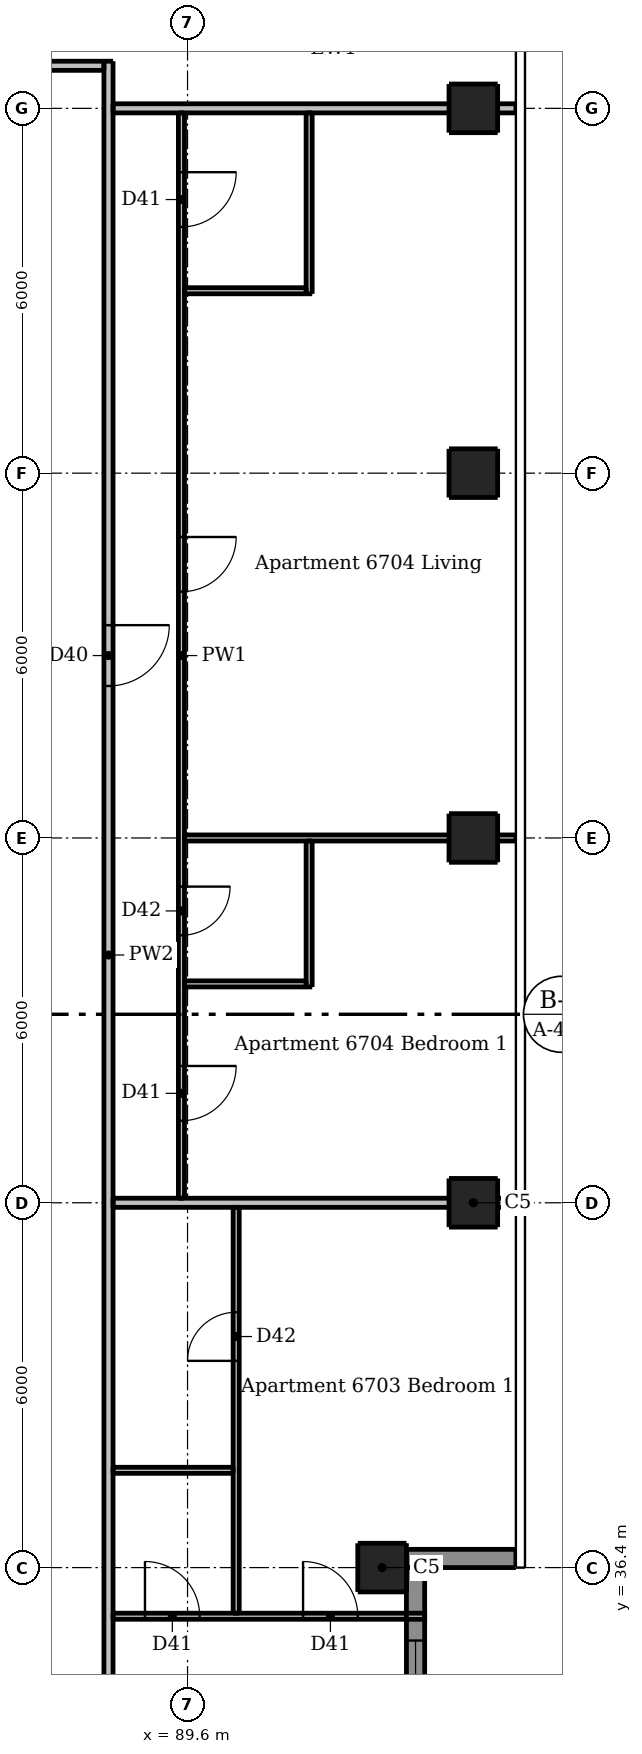
"""IFC4 building model, lengths in metres.
Left out: names, types, materials, properties, quantities, classifications, styles, units other than length and angle.
Written with IfcOpenShell. Run it as: python <this file> out.ifc"""

import sys

from ifc_helpers import new_model, si_unit, direction, frame, frame_2d, origin, origin_2d, place, context, subcontext, project, spatial, rectangle, extrude, element, fill, save


model = new_model("IFC4")
c1 = context("Model", 3, precision=1e-05, world=origin(), true_north=direction((0.0, 1.0)))
c2 = subcontext(c1, "Body", "Model", "MODEL_VIEW")
j1 = project(units=[si_unit("LENGTHUNIT", "METRE"), si_unit("PLANEANGLEUNIT", "RADIAN")], contexts=[c1])
p1 = place(None, origin())
s1 = spatial("IfcSite", under=j1, at=p1, CompositionType="ELEMENT")
p2 = place(p1, origin())
s2 = spatial("IfcBuilding", under=s1, at=p2, CompositionType="ELEMENT")
p3 = place(p2, frame((0.0, 0.0, 252.1)))
s3 = spatial("IfcBuildingStorey", under=s2, at=p3, CompositionType="ELEMENT", Elevation=252.1)
for number, where, z_axis, x_axis in (
    (1, (92.8, 36.4, 0.0), (0.0, 0.0, 1.0), (1.0, 0.0, 0.0)),
    (2, (94.3, 42.4, 0.0), (0.0, 0.0, 1.0), (1.0, 0.0, 0.0)),
    (3, (94.3, 48.4, 0.0), (0.0, 0.0, 1.0), (1.0, 0.0, 0.0)),
    (4, (94.3, 54.4, 0.0), (0.0, 0.0, 1.0), (1.0, 0.0, 0.0)),
    (5, (94.3, 60.4, 0.0), (0.0, 0.0, 1.0), (1.0, 0.0, 0.0)),
):
    element("IfcColumn", number, at=place(p3, frame(where, z_axis=z_axis, x_axis=x_axis)), inside=s3, PredefinedType="COLUMN", context=c2, shape_type="SweptSolid", body=[
        extrude(rectangle(XDim=0.8, YDim=0.8, at=origin_2d()), origin(), (0.0, 0.0, 1.0), 3.05),
    ])
p4 = place(p3, frame((93.2, 36.55, 0.0), z_axis=(0.0, 0.0, 1.0), x_axis=(1.0, 0.0, 0.0)))
e6 = element("IfcWall", 6, at=p4, inside=s3, PredefinedType="SOLIDWALL", context=c2, shape_type="SweptSolid", body=[
    extrude(rectangle(XDim=1.8, YDim=0.3, at=frame_2d((0.9, 0.0))), origin(), (0.0, 0.0, 1.0), 3.05),
])
p5 = place(p3, frame((93.35, 31.3, 0.0), z_axis=(0.0, 0.0, 1.0), x_axis=(0.0, 1.0, 0.0)))
e7 = element("IfcWall", 7, at=p5, inside=s3, PredefinedType="SOLIDWALL", context=c2, shape_type="SweptSolid", body=[
    extrude(rectangle(XDim=5.1, YDim=0.3, at=frame_2d((2.55, 0.0))), origin(), (0.0, 0.0, 1.0), 3.05),
])
p6 = place(p5, frame((1.2, 0.0, 0.15)))
e8 = element("IfcOpeningElement", 8, at=p6, cuts=e7, PredefinedType="OPENING", context=c2, shape_type="SweptSolid", body=[
    extrude(rectangle(XDim=2.7, YDim=2.1, at=frame_2d((1.35, 1.05))), frame((0.0, 0.16, 0.0), z_axis=(0.0, -1.0, 0.0), x_axis=(1.0, 0.0, 0.0)), (0.0, 0.0, 1.0), 0.32),
])
p7 = place(p3, frame((89.5, 60.325, 0.0), z_axis=(0.0, 0.0, 1.0), x_axis=(0.0, -1.0, 0.0)))
e9 = element("IfcWall", 9, at=p7, inside=s3, PredefinedType="PARTITIONING", context=c2, shape_type="SweptSolid", body=[
    extrude(rectangle(XDim=17.85, YDim=0.1, at=frame_2d((8.925, 0.0))), origin(), (0.0, 0.0, 1.0), 3.05),
])
p8 = place(p7, frame((6.975, 0.0, 0.0)))
e10 = element("IfcOpeningElement", 10, at=p8, cuts=e9, PredefinedType="OPENING", context=c2, shape_type="SweptSolid", body=[
    extrude(rectangle(XDim=0.9, YDim=2.1, at=frame_2d((0.45, 1.05))), frame((0.0, 0.06, 0.0), z_axis=(0.0, -1.0, 0.0), x_axis=(1.0, 0.0, 0.0)), (0.0, 0.0, 1.0), 0.12),
])
p9 = place(p7, frame((0.975, 0.0, 0.0)))
e11 = element("IfcOpeningElement", 11, at=p9, cuts=e9, PredefinedType="OPENING", context=c2, shape_type="SweptSolid", body=[
    extrude(rectangle(XDim=0.9, YDim=2.1, at=frame_2d((0.45, 1.05))), frame((0.0, 0.06, 0.0), z_axis=(0.0, -1.0, 0.0), x_axis=(1.0, 0.0, 0.0)), (0.0, 0.0, 1.0), 0.12),
])
p10 = place(p7, frame((15.675, 0.0, 0.0)))
e12 = element("IfcOpeningElement", 12, at=p10, cuts=e9, PredefinedType="OPENING", context=c2, shape_type="SweptSolid", body=[
    extrude(rectangle(XDim=0.9, YDim=2.1, at=frame_2d((0.45, 1.05))), frame((0.0, 0.06, 0.0), z_axis=(0.0, -1.0, 0.0), x_axis=(1.0, 0.0, 0.0)), (0.0, 0.0, 1.0), 0.12),
])
p11 = place(p7, frame((12.725, 0.0, 0.0)))
e13 = element("IfcOpeningElement", 13, at=p11, cuts=e9, PredefinedType="OPENING", context=c2, shape_type="SweptSolid", body=[
    extrude(rectangle(XDim=0.8, YDim=2.1, at=frame_2d((0.4, 1.05))), frame((0.0, 0.06, 0.0), z_axis=(0.0, -1.0, 0.0), x_axis=(1.0, 0.0, 0.0)), (0.0, 0.0, 1.0), 0.12),
])
p12 = place(p3, frame((90.4, 35.65, 0.0), z_axis=(0.0, 0.0, 1.0), x_axis=(0.0, 1.0, 0.0)))
e14 = element("IfcWall", 14, at=p12, inside=s3, PredefinedType="PARTITIONING", context=c2, shape_type="SweptSolid", body=[
    extrude(rectangle(XDim=6.675, YDim=0.1, at=frame_2d((3.337, 0.0))), origin(), (0.0, 0.0, 1.0), 3.05),
])
p13 = place(p12, frame((4.15, 0.0, 0.0)))
e15 = element("IfcOpeningElement", 15, at=p13, cuts=e14, PredefinedType="OPENING", context=c2, shape_type="SweptSolid", body=[
    extrude(rectangle(XDim=0.8, YDim=2.1, at=frame_2d((0.4, 1.05))), frame((0.0, 0.06, 0.0), z_axis=(0.0, -1.0, 0.0), x_axis=(1.0, 0.0, 0.0)), (0.0, 0.0, 1.0), 0.12),
])
p14 = place(p3, frame((91.6, 45.95, 0.0), z_axis=(0.0, 0.0, 1.0), x_axis=(0.0, 1.0, 0.0)))
e16 = element("IfcWall", 16, at=p14, inside=s3, PredefinedType="PARTITIONING", context=c2, shape_type="SweptSolid", body=[
    extrude(rectangle(XDim=2.4, YDim=0.1, at=frame_2d((1.2, 0.0))), origin(), (0.0, 0.0, 1.0), 3.05),
])
p15 = place(p3, frame((91.6, 57.35, 0.0), z_axis=(0.0, 0.0, 1.0), x_axis=(0.0, 1.0, 0.0)))
e17 = element("IfcWall", 17, at=p15, inside=s3, PredefinedType="PARTITIONING", context=c2, shape_type="SweptSolid", body=[
    extrude(rectangle(XDim=2.975, YDim=0.1, at=frame_2d((1.487, 0.0))), origin(), (0.0, 0.0, 1.0), 3.05),
])
p16 = place(p3, frame((89.55, 57.4, 0.0), z_axis=(0.0, 0.0, 1.0), x_axis=(1.0, 0.0, 0.0)))
e18 = element("IfcWall", 18, at=p16, inside=s3, PredefinedType="PARTITIONING", context=c2, shape_type="SweptSolid", body=[
    extrude(rectangle(XDim=2.0, YDim=0.1, at=frame_2d((1.0, 0.0))), origin(), (0.0, 0.0, 1.0), 3.05),
])
p17 = place(p3, frame((89.55, 48.4, 0.0), z_axis=(0.0, 0.0, 1.0), x_axis=(1.0, 0.0, 0.0)))
e19 = element("IfcWall", 19, at=p17, inside=s3, PredefinedType="PARTITIONING", context=c2, shape_type="SweptSolid", body=[
    extrude(rectangle(XDim=5.45, YDim=0.1, at=frame_2d((2.725, 0.0))), origin(), (0.0, 0.0, 1.0), 2.59),
])
p18 = place(p3, frame((89.55, 46.0, 0.0), z_axis=(0.0, 0.0, 1.0), x_axis=(1.0, 0.0, 0.0)))
e20 = element("IfcWall", 20, at=p18, inside=s3, PredefinedType="PARTITIONING", context=c2, shape_type="SweptSolid", body=[
    extrude(rectangle(XDim=2.0, YDim=0.1, at=frame_2d((1.0, 0.0))), origin(), (0.0, 0.0, 1.0), 3.05),
])
p19 = place(p3, frame((88.375, 38.0, 0.0), z_axis=(0.0, 0.0, 1.0), x_axis=(1.0, 0.0, 0.0)))
e21 = element("IfcWall", 21, at=p19, inside=s3, PredefinedType="PARTITIONING", context=c2, shape_type="SweptSolid", body=[
    extrude(rectangle(XDim=1.975, YDim=0.1, at=frame_2d((0.988, 0.0))), origin(), (0.0, 0.0, 1.0), 3.05),
])
p20 = place(p3, frame((88.375, 35.6, 0.0), z_axis=(0.0, 0.0, 1.0), x_axis=(1.0, 0.0, 0.0)))
e22 = element("IfcWall", 22, at=p20, inside=s3, PredefinedType="PARTITIONING", context=c2, shape_type="SweptSolid", body=[
    extrude(rectangle(XDim=5.125, YDim=0.1, at=frame_2d((2.562, 0.0))), origin(), (0.0, 0.0, 1.0), 3.05),
])
p21 = place(p20, frame((0.525, 0.0, 0.0)))
e23 = element("IfcOpeningElement", 23, at=p21, cuts=e22, PredefinedType="OPENING", context=c2, shape_type="SweptSolid", body=[
    extrude(rectangle(XDim=0.9, YDim=2.1, at=frame_2d((0.45, 1.05))), frame((0.0, 0.06, 0.0), z_axis=(0.0, -1.0, 0.0), x_axis=(1.0, 0.0, 0.0)), (0.0, 0.0, 1.0), 0.12),
])
p22 = place(p20, frame((3.125, 0.0, 0.0)))
e24 = element("IfcOpeningElement", 24, at=p22, cuts=e22, PredefinedType="OPENING", context=c2, shape_type="SweptSolid", body=[
    extrude(rectangle(XDim=0.9, YDim=2.1, at=frame_2d((0.45, 1.05))), frame((0.0, 0.06, 0.0), z_axis=(0.0, -1.0, 0.0), x_axis=(1.0, 0.0, 0.0)), (0.0, 0.0, 1.0), 0.12),
])
p23 = place(p3, frame((88.3, 61.175, 0.0), z_axis=(0.0, 0.0, 1.0), x_axis=(0.0, -1.0, 0.0)))
e25 = element("IfcWall", 25, at=p23, inside=s3, PredefinedType="PARTITIONING", context=c2, shape_type="SweptSolid", body=[
    extrude(rectangle(XDim=29.4, YDim=0.15, at=frame_2d((14.7, 0.0))), origin(), (0.0, 0.0, 1.0), 3.05),
])
p24 = place(p23, frame((27.025, 0.0, 0.0)))
e26 = element("IfcOpeningElement", 26, at=p24, cuts=e25, PredefinedType="OPENING", context=c2, shape_type="SweptSolid", body=[
    extrude(rectangle(XDim=1.0, YDim=2.1, at=frame_2d((0.5, 1.05))), frame((0.0, 0.085, 0.0), z_axis=(0.0, -1.0, 0.0), x_axis=(1.0, 0.0, 0.0)), (0.0, 0.0, 1.0), 0.17),
])
p25 = place(p23, frame((9.275, 0.0, 0.0)))
e27 = element("IfcOpeningElement", 27, at=p25, cuts=e25, PredefinedType="OPENING", context=c2, shape_type="SweptSolid", body=[
    extrude(rectangle(XDim=1.0, YDim=2.1, at=frame_2d((0.5, 1.05))), frame((0.0, 0.085, 0.0), z_axis=(0.0, -1.0, 0.0), x_axis=(1.0, 0.0, 0.0)), (0.0, 0.0, 1.0), 0.17),
])
p26 = place(p3, frame((58.975, 61.1, 0.0), z_axis=(0.0, 0.0, 1.0), x_axis=(1.0, 0.0, 0.0)))
e28 = element("IfcWall", 28, at=p26, inside=s3, PredefinedType="PARTITIONING", context=c2, shape_type="SweptSolid", body=[
    extrude(rectangle(XDim=29.25, YDim=0.15, at=frame_2d((14.625, 0.0))), origin(), (0.0, 0.0, 1.0), 3.05),
])
p27 = place(p26, frame((9.125, 0.0, 0.0)))
e29 = element("IfcOpeningElement", 29, at=p27, cuts=e28, PredefinedType="OPENING", context=c2, shape_type="SweptSolid", body=[
    extrude(rectangle(XDim=1.0, YDim=2.1, at=frame_2d((0.5, 1.05))), frame((0.0, 0.085, 0.0), z_axis=(0.0, -1.0, 0.0), x_axis=(1.0, 0.0, 0.0)), (0.0, 0.0, 1.0), 0.17),
])
p28 = place(p26, frame((26.475, 0.0, 0.0)))
e30 = element("IfcOpeningElement", 30, at=p28, cuts=e28, PredefinedType="OPENING", context=c2, shape_type="SweptSolid", body=[
    extrude(rectangle(XDim=1.0, YDim=2.1, at=frame_2d((0.5, 1.05))), frame((0.0, 0.085, 0.0), z_axis=(0.0, -1.0, 0.0), x_axis=(1.0, 0.0, 0.0)), (0.0, 0.0, 1.0), 0.17),
])
p29 = place(p3, frame((88.375, 60.4, 0.0), z_axis=(0.0, 0.0, 1.0), x_axis=(1.0, 0.0, 0.0)))
e31 = element("IfcWall", 31, at=p29, inside=s3, PredefinedType="PARTITIONING", context=c2, shape_type="SweptSolid", body=[
    extrude(rectangle(XDim=6.625, YDim=0.15, at=frame_2d((3.312, 0.0))), origin(), (0.0, 0.0, 1.0), 2.647),
])
p30 = place(p3, frame((88.375, 42.4, 0.0), z_axis=(0.0, 0.0, 1.0), x_axis=(1.0, 0.0, 0.0)))
e32 = element("IfcWall", 32, at=p30, inside=s3, PredefinedType="PARTITIONING", context=c2, shape_type="SweptSolid", body=[
    extrude(rectangle(XDim=6.625, YDim=0.15, at=frame_2d((3.312, 0.0))), origin(), (0.0, 0.0, 1.0), 2.59),
])
p31 = place(p6, origin())
e33 = element("IfcWindow", 33, at=p31, inside=s3, PartitioningType="DOUBLE_PANEL_VERTICAL", PredefinedType="WINDOW", context=c2, shape_type="SweptSolid", body=[
    extrude(rectangle(XDim=2.7, YDim=2.1, at=frame_2d((1.35, 1.05))), frame((0.0, 0.03, 0.0), z_axis=(0.0, -1.0, 0.0), x_axis=(1.0, 0.0, 0.0)), (0.0, 0.0, 1.0), 0.06),
])
fill(e8, e33)
p32 = place(p21, origin())
e34 = element("IfcDoor", 34, at=p32, inside=s3, OperationType="SINGLE_SWING_LEFT", PredefinedType="DOOR", context=c2, shape_type="SweptSolid", body=[
    extrude(rectangle(XDim=0.9, YDim=2.1, at=frame_2d((0.45, 1.05))), frame((0.0, 0.025, 0.0), z_axis=(0.0, -1.0, 0.0), x_axis=(1.0, 0.0, 0.0)), (0.0, 0.0, 1.0), 0.05),
])
fill(e23, e34)
p33 = place(p22, origin())
e35 = element("IfcDoor", 35, at=p33, inside=s3, OperationType="SINGLE_SWING_LEFT", PredefinedType="DOOR", context=c2, shape_type="SweptSolid", body=[
    extrude(rectangle(XDim=0.9, YDim=2.1, at=frame_2d((0.45, 1.05))), frame((0.0, 0.025, 0.0), z_axis=(0.0, -1.0, 0.0), x_axis=(1.0, 0.0, 0.0)), (0.0, 0.0, 1.0), 0.05),
])
fill(e24, e35)
p34 = place(p13, origin())
e36 = element("IfcDoor", 36, at=p34, inside=s3, OperationType="SINGLE_SWING_LEFT", PredefinedType="DOOR", context=c2, shape_type="SweptSolid", body=[
    extrude(rectangle(XDim=0.8, YDim=2.1, at=frame_2d((0.4, 1.05))), frame((0.0, 0.025, 0.0), z_axis=(0.0, -1.0, 0.0), x_axis=(1.0, 0.0, 0.0)), (0.0, 0.0, 1.0), 0.05),
])
fill(e15, e36)
p35 = place(p25, origin())
e37 = element("IfcDoor", 37, at=p35, inside=s3, OperationType="SINGLE_SWING_LEFT", PredefinedType="DOOR", context=c2, shape_type="SweptSolid", body=[
    extrude(rectangle(XDim=1.0, YDim=2.1, at=frame_2d((0.5, 1.05))), frame((0.0, 0.025, 0.0), z_axis=(0.0, -1.0, 0.0), x_axis=(1.0, 0.0, 0.0)), (0.0, 0.0, 1.0), 0.05),
])
fill(e27, e37)
p36 = place(p8, origin())
e38 = element("IfcDoor", 38, at=p36, inside=s3, OperationType="SINGLE_SWING_LEFT", PredefinedType="DOOR", context=c2, shape_type="SweptSolid", body=[
    extrude(rectangle(XDim=0.9, YDim=2.1, at=frame_2d((0.45, 1.05))), frame((0.0, 0.025, 0.0), z_axis=(0.0, -1.0, 0.0), x_axis=(1.0, 0.0, 0.0)), (0.0, 0.0, 1.0), 0.05),
])
fill(e10, e38)
p37 = place(p9, origin())
e39 = element("IfcDoor", 39, at=p37, inside=s3, OperationType="SINGLE_SWING_LEFT", PredefinedType="DOOR", context=c2, shape_type="SweptSolid", body=[
    extrude(rectangle(XDim=0.9, YDim=2.1, at=frame_2d((0.45, 1.05))), frame((0.0, 0.025, 0.0), z_axis=(0.0, -1.0, 0.0), x_axis=(1.0, 0.0, 0.0)), (0.0, 0.0, 1.0), 0.05),
])
fill(e11, e39)
p38 = place(p10, origin())
e40 = element("IfcDoor", 40, at=p38, inside=s3, OperationType="SINGLE_SWING_LEFT", PredefinedType="DOOR", context=c2, shape_type="SweptSolid", body=[
    extrude(rectangle(XDim=0.9, YDim=2.1, at=frame_2d((0.45, 1.05))), frame((0.0, 0.025, 0.0), z_axis=(0.0, -1.0, 0.0), x_axis=(1.0, 0.0, 0.0)), (0.0, 0.0, 1.0), 0.05),
])
fill(e12, e40)
p39 = place(p11, origin())
e41 = element("IfcDoor", 41, at=p39, inside=s3, OperationType="SINGLE_SWING_LEFT", PredefinedType="DOOR", context=c2, shape_type="SweptSolid", body=[
    extrude(rectangle(XDim=0.8, YDim=2.1, at=frame_2d((0.4, 1.05))), frame((0.0, 0.025, 0.0), z_axis=(0.0, -1.0, 0.0), x_axis=(1.0, 0.0, 0.0)), (0.0, 0.0, 1.0), 0.05),
])
fill(e13, e41)
save(model, sys.argv[1])
